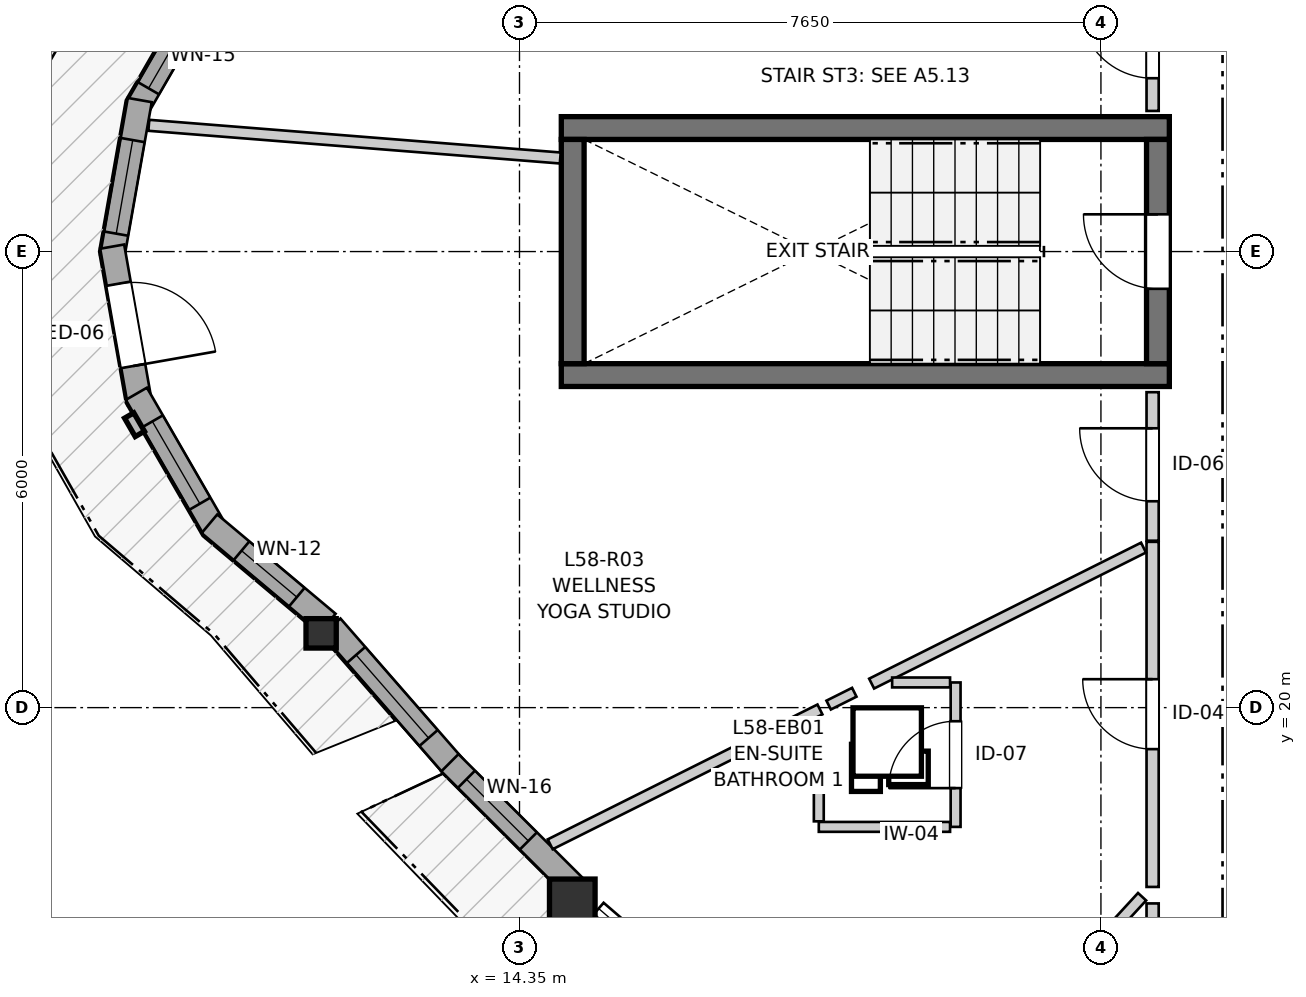
"""IFC4 building model, lengths in metres.
Left out: names, types, materials, properties, quantities, classifications, styles, units other than length and angle.
Written with IfcOpenShell. Run it as: python <this file> out.ifc"""

import sys

from ifc_helpers import new_model, si_unit, direction, frame, frame_2d, origin, origin_2d, place, context, subcontext, project, spatial, rectangle, i_section, extrude, source, transform, mapped, element, fill, save


model = new_model("IFC4")
c1 = context("Model", 3, precision=1e-05, world=origin(), true_north=direction((0.0, 1.0)))
c2 = subcontext(c1, "Body", "Model", "MODEL_VIEW")
j1 = project(units=[si_unit("LENGTHUNIT", "METRE"), si_unit("PLANEANGLEUNIT", "RADIAN")], contexts=[c1])
p1 = place(None, origin())
s1 = spatial("IfcSite", under=j1, at=p1, CompositionType="ELEMENT")
p2 = place(p1, origin())
s2 = spatial("IfcBuilding", under=s1, at=p2, CompositionType="ELEMENT")
p3 = place(p2, frame((0.0, 0.0, 195.6)))
s3 = spatial("IfcBuildingStorey", under=s2, at=p3, CompositionType="ELEMENT", Elevation=195.6)
for number, where, z_axis, x_axis in (
    (1, (14.9, 24.375, 0.0), (0.0, 0.0, 1.0), (1.0, 0.0, 0.0)),
    (2, (22.9, 27.625, 0.0), (0.0, 0.0, 1.0), (-1.0, 0.0, 0.0)),
):
    element("IfcWall", number, at=place(p3, frame(where, z_axis=z_axis, x_axis=x_axis)), inside=s3, PredefinedType="SHEAR", context=c2, shape_type="SweptSolid", body=[
        extrude(rectangle(XDim=8.0, YDim=0.3, at=frame_2d((4.0, 0.0))), origin(), (0.0, 0.0, 1.0), 2.96),
    ])
p4 = place(p3, frame((15.05, 27.475, 0.0), z_axis=(0.0, 0.0, 1.0), x_axis=(0.0, -1.0, 0.0)))
e3 = element("IfcWall", 3, at=p4, inside=s3, PredefinedType="SHEAR", context=c2, shape_type="SweptSolid", body=[
    extrude(rectangle(XDim=2.95, YDim=0.3, at=frame_2d((1.475, 0.0))), origin(), (0.0, 0.0, 1.0), 2.96),
])
p5 = place(p3, frame((22.75, 24.525, 0.0), z_axis=(0.0, 0.0, 1.0), x_axis=(0.0, 1.0, 0.0)))
e4 = element("IfcWall", 4, at=p5, inside=s3, PredefinedType="SHEAR", context=c2, shape_type="SweptSolid", body=[
    extrude(rectangle(XDim=2.95, YDim=0.3, at=frame_2d((1.475, 0.0))), origin(), (0.0, 0.0, 1.0), 2.96),
])
p6 = place(p5, frame((0.985, 0.0, 0.0)))
e5 = element("IfcOpeningElement", 5, at=p6, cuts=e4, PredefinedType="OPENING", context=c2, shape_type="SweptSolid", body=[
    extrude(rectangle(XDim=0.98, YDim=2.15, at=frame_2d((0.49, 1.075))), frame((0.0, 0.16, 0.0), z_axis=(0.0, -1.0, 0.0), x_axis=(1.0, 0.0, 0.0)), (0.0, 0.0, 1.0), 0.32),
])
m1 = source(origin(), c2, "Body", "SweptSolid", [
    extrude(i_section(OverallWidth=0.398, OverallDepth=0.387, WebThickness=0.019, FlangeThickness=0.03, FilletRadius=0.015, at=origin_2d()), origin(), (0.0, 0.0, 1.0), 2.96),
])
p7 = place(p3, frame((11.74, 20.977, 0.0), z_axis=(0.0, 0.0, 1.0), x_axis=(1.0, 0.0, 0.0)))
e6 = element("IfcColumn", 6, at=p7, inside=s3, PredefinedType="PILASTER", context=c2, shape_type="MappedRepresentation", body=[
    mapped(m1, transform((0.0, 0.0, 0.0), x_axis=(1.0, 0.0, 0.0), y_axis=(0.0, 1.0, 0.0), z_axis=(0.0, 0.0, 1.0), scale=1.0)),
])
m2 = source(origin(), c2, "Body", "SweptSolid", [
    extrude(rectangle(XDim=0.6, YDim=0.6, at=origin_2d()), origin(), (0.0, 0.0, 1.0), 2.96),
])
p8 = place(p3, frame((15.044, 17.445, 0.0), z_axis=(0.0, 0.0, 1.0), x_axis=(1.0, 0.0, 0.0)))
e7 = element("IfcColumn", 7, at=p8, inside=s3, PredefinedType="COLUMN", context=c2, shape_type="MappedRepresentation", body=[
    mapped(m2, transform((0.0, 0.0, 0.0), x_axis=(1.0, 0.0, 0.0), y_axis=(0.0, 1.0, 0.0), z_axis=(0.0, 0.0, 1.0), scale=1.0)),
])
p9 = place(p3, frame((10.354, 29.681, 0.0), z_axis=(0.0, 0.0, 1.0), x_axis=(-0.499995423472, -0.866028046028, 0.0)))
e8 = element("IfcWall", 8, at=p9, inside=s3, PredefinedType="SOLIDWALL", context=c2, shape_type="SweptSolid", body=[
    extrude(rectangle(XDim=2.09, YDim=0.32, at=frame_2d((1.045, 0.0))), origin(), (0.0, 0.0, 1.0), 2.58),
])
p10 = place(p9, frame((0.32, 0.0, 0.82)))
e9 = element("IfcOpeningElement", 9, at=p10, cuts=e8, PredefinedType="OPENING", context=c2, shape_type="SweptSolid", body=[
    extrude(rectangle(XDim=1.45, YDim=1.25, at=frame_2d((0.725, 0.625))), frame((0.0, 0.17, 0.0), z_axis=(0.0, -1.0, 0.0), x_axis=(1.0, 0.0, 0.0)), (0.0, 0.0, 1.0), 0.34),
])
p11 = place(p3, frame((9.354, 27.993, 0.0), z_axis=(0.0, 0.0, 1.0), x_axis=(-0.173672066494, -0.984803540469, 0.0)))
e10 = element("IfcWall", 10, at=p11, inside=s3, PredefinedType="SOLIDWALL", context=c2, shape_type="SweptSolid", body=[
    extrude(rectangle(XDim=2.09, YDim=0.32, at=frame_2d((1.045, 0.0))), origin(), (0.0, 0.0, 1.0), 2.58),
])
p12 = place(p11, frame((0.535, 0.0, 0.82)))
e11 = element("IfcOpeningElement", 11, at=p12, cuts=e10, PredefinedType="OPENING", context=c2, shape_type="SweptSolid", body=[
    extrude(rectangle(XDim=1.25, YDim=1.35, at=frame_2d((0.625, 0.675))), frame((0.0, 0.17, 0.0), z_axis=(0.0, -1.0, 0.0), x_axis=(1.0, 0.0, 0.0)), (0.0, 0.0, 1.0), 0.34),
])
p13 = place(p3, frame((8.991, 26.065, 0.0), z_axis=(0.0, 0.0, 1.0), x_axis=(0.173672066494, -0.984803540469, 0.0)))
e12 = element("IfcWall", 12, at=p13, inside=s3, PredefinedType="SOLIDWALL", context=c2, shape_type="SweptSolid", body=[
    extrude(rectangle(XDim=2.09, YDim=0.32, at=frame_2d((1.045, 0.0))), origin(), (0.0, 0.0, 1.0), 2.58),
])
p14 = place(p13, frame((0.495, 0.0, 0.0)))
e13 = element("IfcOpeningElement", 13, at=p14, cuts=e12, PredefinedType="OPENING", context=c2, shape_type="SweptSolid", body=[
    extrude(rectangle(XDim=1.1, YDim=2.1, at=frame_2d((0.55, 1.05))), frame((0.0, 0.17, 0.0), z_axis=(0.0, -1.0, 0.0), x_axis=(1.0, 0.0, 0.0)), (0.0, 0.0, 1.0), 0.34),
])
p15 = place(p3, frame((9.309, 24.129, 0.0), z_axis=(0.0, 0.0, 1.0), x_axis=(0.499995423472, -0.866028046028, 0.0)))
e14 = element("IfcWall", 14, at=p15, inside=s3, PredefinedType="SOLIDWALL", context=c2, shape_type="SweptSolid", body=[
    extrude(rectangle(XDim=2.09, YDim=0.32, at=frame_2d((1.045, 0.0))), origin(), (0.0, 0.0, 1.0), 2.58),
])
p16 = place(p15, frame((0.42, 0.0, 0.82)))
e15 = element("IfcOpeningElement", 15, at=p16, cuts=e14, PredefinedType="OPENING", context=c2, shape_type="SweptSolid", body=[
    extrude(rectangle(XDim=1.25, YDim=1.35, at=frame_2d((0.625, 0.675))), frame((0.0, 0.17, 0.0), z_axis=(0.0, -1.0, 0.0), x_axis=(1.0, 0.0, 0.0)), (0.0, 0.0, 1.0), 0.34),
])
p17 = place(p3, frame((10.271, 22.419, 0.0), z_axis=(0.0, 0.0, 1.0), x_axis=(0.766099948115, -0.642721455608, 0.0)))
e16 = element("IfcWall", 16, at=p17, inside=s3, PredefinedType="SOLIDWALL", context=c2, shape_type="SweptSolid", body=[
    extrude(rectangle(XDim=2.032, YDim=0.32, at=frame_2d((1.016, 0.0))), origin(), (0.0, 0.0, 1.0), 2.58),
])
p18 = place(p17, frame((0.551, 0.0, 0.82)))
e17 = element("IfcOpeningElement", 17, at=p18, cuts=e16, PredefinedType="OPENING", context=c2, shape_type="SweptSolid", body=[
    extrude(rectangle(XDim=0.95, YDim=1.35, at=frame_2d((0.475, 0.675))), frame((0.0, 0.17, 0.0), z_axis=(0.0, -1.0, 0.0), x_axis=(1.0, 0.0, 0.0)), (0.0, 0.0, 1.0), 0.34),
])
p19 = place(p3, frame((11.874, 21.067, 0.0), z_axis=(0.0, 0.0, 1.0), x_axis=(0.657571063417, -0.753392524888, 0.0)))
e18 = element("IfcWall", 18, at=p19, inside=s3, PredefinedType="SOLIDWALL", context=c2, shape_type="SweptSolid", body=[
    extrude(rectangle(XDim=2.464, YDim=0.32, at=frame_2d((1.232, 0.0))), origin(), (0.0, 0.0, 1.0), 2.58),
])
p20 = place(p19, frame((0.497, 0.0, 0.82)))
e19 = element("IfcOpeningElement", 19, at=p20, cuts=e18, PredefinedType="OPENING", context=c2, shape_type="SweptSolid", body=[
    extrude(rectangle(XDim=1.45, YDim=1.25, at=frame_2d((0.725, 0.625))), frame((0.0, 0.17, 0.0), z_axis=(0.0, -1.0, 0.0), x_axis=(1.0, 0.0, 0.0)), (0.0, 0.0, 1.0), 0.34),
])
p21 = place(p3, frame((13.434, 19.275, 0.0), z_axis=(0.0, 0.0, 1.0), x_axis=(0.708408377073, -0.705802784985, 0.0)))
e20 = element("IfcWall", 20, at=p21, inside=s3, PredefinedType="SOLIDWALL", context=c2, shape_type="SweptSolid", body=[
    extrude(rectangle(XDim=2.343, YDim=0.32, at=frame_2d((1.171, 0.0))), origin(), (0.0, 0.0, 1.0), 2.58),
])
p22 = place(p21, frame((0.308, 0.0, 0.82)))
e21 = element("IfcOpeningElement", 21, at=p22, cuts=e20, PredefinedType="OPENING", context=c2, shape_type="SweptSolid", body=[
    extrude(rectangle(XDim=1.15, YDim=1.2, at=frame_2d((0.575, 0.6))), frame((0.0, 0.17, 0.0), z_axis=(0.0, -1.0, 0.0), x_axis=(1.0, 0.0, 0.0)), (0.0, 0.0, 1.0), 0.34),
])
p23 = place(p3, frame((22.68, 17.641, 0.0), z_axis=(0.0, 0.0, 1.0), x_axis=(0.0, 1.0, 0.0)))
e22 = element("IfcWall", 22, at=p23, inside=s3, PredefinedType="PARTITIONING", context=c2, shape_type="SweptSolid", body=[
    extrude(rectangle(XDim=4.54, YDim=0.16, at=frame_2d((2.27, 0.0))), origin(), (0.0, 0.0, 1.0), 2.96),
])
p24 = place(p23, frame((1.813, 0.0, 0.0)))
e23 = element("IfcOpeningElement", 23, at=p24, cuts=e22, PredefinedType="OPENING", context=c2, shape_type="SweptSolid", body=[
    extrude(rectangle(XDim=0.92, YDim=2.1, at=frame_2d((0.46, 1.05))), frame((0.0, 0.09, 0.0), z_axis=(0.0, -1.0, 0.0), x_axis=(1.0, 0.0, 0.0)), (0.0, 0.0, 1.0), 0.18),
])
p25 = place(p3, frame((22.68, 22.196, 0.0), z_axis=(0.0, 0.0, 1.0), x_axis=(0.0, 1.0, 0.0)))
e24 = element("IfcWall", 24, at=p25, inside=s3, PredefinedType="PARTITIONING", context=c2, shape_type="SweptSolid", body=[
    extrude(rectangle(XDim=1.954, YDim=0.16, at=frame_2d((0.977, 0.0))), origin(), (0.0, 0.0, 1.0), 2.96),
])
p26 = place(p25, frame((0.519, 0.0, 0.0)))
e25 = element("IfcOpeningElement", 25, at=p26, cuts=e24, PredefinedType="OPENING", context=c2, shape_type="SweptSolid", body=[
    extrude(rectangle(XDim=0.96, YDim=2.1, at=frame_2d((0.48, 1.05))), frame((0.0, 0.09, 0.0), z_axis=(0.0, -1.0, 0.0), x_axis=(1.0, 0.0, 0.0)), (0.0, 0.0, 1.0), 0.18),
])
p27 = place(p3, frame((20.088, 18.431, 0.0), z_axis=(0.0, 0.0, 1.0), x_axis=(0.0, 1.0, 0.0)))
e26 = element("IfcWall", 26, at=p27, inside=s3, PredefinedType="PARTITIONING", context=c2, shape_type="SweptSolid", body=[
    extrude(rectangle(XDim=1.9, YDim=0.13, at=frame_2d((0.95, 0.0))), origin(), (0.0, 0.0, 1.0), 2.96),
])
p28 = place(p27, frame((0.51, 0.0, 0.0)))
e27 = element("IfcOpeningElement", 27, at=p28, cuts=e26, PredefinedType="OPENING", context=c2, shape_type="SweptSolid", body=[
    extrude(rectangle(XDim=0.88, YDim=2.05, at=frame_2d((0.44, 1.025))), frame((0.0, 0.075, 0.0), z_axis=(0.0, -1.0, 0.0), x_axis=(1.0, 0.0, 0.0)), (0.0, 0.0, 1.0), 0.15),
])
p29 = place(p3, frame((22.68, 27.85, 0.0), z_axis=(0.0, 0.0, 1.0), x_axis=(0.0, 1.0, 0.0)))
e28 = element("IfcWall", 28, at=p29, inside=s3, PredefinedType="PARTITIONING", context=c2, shape_type="SweptSolid", body=[
    extrude(rectangle(XDim=1.731, YDim=0.16, at=frame_2d((0.865, 0.0))), origin(), (0.0, 0.0, 1.0), 2.96),
])
p30 = place(p29, frame((0.43, 0.0, 0.0)))
e29 = element("IfcOpeningElement", 29, at=p30, cuts=e28, PredefinedType="OPENING", context=c2, shape_type="SweptSolid", body=[
    extrude(rectangle(XDim=0.96, YDim=2.1, at=frame_2d((0.48, 1.05))), frame((0.0, 0.09, 0.0), z_axis=(0.0, -1.0, 0.0), x_axis=(1.0, 0.0, 0.0)), (0.0, 0.0, 1.0), 0.18),
])
p31 = place(p3, frame((9.473, 27.661, 0.0), z_axis=(0.0, 0.0, 1.0), x_axis=(0.996864548282, -0.079126938392, 0.0)))
e30 = element("IfcWall", 30, at=p31, inside=s3, PredefinedType="PARTITIONING", context=c2, shape_type="SweptSolid", body=[
    extrude(rectangle(XDim=5.43, YDim=0.145, at=frame_2d((2.715, 0.0))), origin(), (0.0, 0.0, 1.0), 2.96),
])
p32 = place(p3, frame((19.625, 14.343, 0.0), z_axis=(0.0, 0.0, 1.0), x_axis=(0.677104421975, 0.735886949023, 0.0)))
e31 = element("IfcWall", 31, at=p32, inside=s3, PredefinedType="PARTITIONING", context=c2, shape_type="SweptSolid", body=[
    extrude(rectangle(XDim=4.307, YDim=0.145, at=frame_2d((2.153, 0.0))), origin(), (0.0, 0.0, 1.0), 2.96),
])
p33 = place(p3, frame((18.983, 20.316, 0.0), z_axis=(0.0, 0.0, 1.0), x_axis=(0.894366146285, 0.447335664104, 0.0)))
e32 = element("IfcWall", 32, at=p33, inside=s3, PredefinedType="PARTITIONING", context=c2, shape_type="SweptSolid", body=[
    extrude(rectangle(XDim=4.0, YDim=0.145, at=frame_2d((2.0, 0.0))), origin(), (0.0, 0.0, 1.0), 2.96),
])
p34 = place(p3, frame((14.754, 18.202, 0.0), z_axis=(0.0, 0.0, 1.0), x_axis=(0.894464106055, 0.44713975777, 0.0)))
e33 = element("IfcWall", 33, at=p34, inside=s3, PredefinedType="PARTITIONING", context=c2, shape_type="SweptSolid", body=[
    extrude(rectangle(XDim=3.968, YDim=0.145, at=frame_2d((1.984, 0.0))), origin(), (0.0, 0.0, 1.0), 2.96),
])
p35 = place(p3, frame((22.68, 15.796, 0.0), z_axis=(0.0, 0.0, 1.0), x_axis=(0.0, 1.0, 0.0)))
e34 = element("IfcWall", 34, at=p35, inside=s3, PredefinedType="PARTITIONING", context=c2, shape_type="SweptSolid", body=[
    extrude(rectangle(XDim=1.628, YDim=0.16, at=frame_2d((0.814, 0.0))), origin(), (0.0, 0.0, 1.0), 2.96),
])
p36 = place(p3, frame((18.288, 18.431, 0.0), z_axis=(0.0, 0.0, 1.0), x_axis=(1.0, 0.0, 0.0)))
e35 = element("IfcWall", 35, at=p36, inside=s3, PredefinedType="PARTITIONING", context=c2, shape_type="SweptSolid", body=[
    extrude(rectangle(XDim=1.727, YDim=0.13, at=frame_2d((0.863, 0.0))), origin(), (0.0, 0.0, 1.0), 2.96),
])
p37 = place(p3, frame((18.288, 18.504, 0.0), z_axis=(0.0, 0.0, 1.0), x_axis=(0.0, 1.0, 0.0)))
e36 = element("IfcWall", 36, at=p37, inside=s3, PredefinedType="PARTITIONING", context=c2, shape_type="SweptSolid", body=[
    extrude(rectangle(XDim=1.344, YDim=0.13, at=frame_2d((0.672, 0.0))), origin(), (0.0, 0.0, 1.0), 2.96),
])
p38 = place(p3, frame((19.253, 20.331, 0.0), z_axis=(0.0, 0.0, 1.0), x_axis=(1.0, 0.0, 0.0)))
e37 = element("IfcWall", 37, at=p38, inside=s3, PredefinedType="PARTITIONING", context=c2, shape_type="SweptSolid", body=[
    extrude(rectangle(XDim=0.762, YDim=0.13, at=frame_2d((0.381, 0.0))), origin(), (0.0, 0.0, 1.0), 2.96),
])
p39 = place(p3, frame((18.417, 20.033, 0.0), z_axis=(0.0, 0.0, 1.0), x_axis=(0.894427191, 0.4472135955, 0.0)))
e38 = element("IfcWall", 38, at=p39, inside=s3, PredefinedType="PARTITIONING", context=c2, shape_type="SweptSolid", body=[
    extrude(rectangle(XDim=0.377, YDim=0.13, at=frame_2d((0.188, 0.0))), origin(), (0.0, 0.0, 1.0), 2.96),
])
m3 = source(origin(), c2, "Body", "SweptSolid", [
    extrude(rectangle(XDim=1.45, YDim=1.25, at=frame_2d((0.725, 0.625))), frame((0.0, 0.03, 0.0), z_axis=(0.0, -1.0, 0.0), x_axis=(1.0, 0.0, 0.0)), (0.0, 0.0, 1.0), 0.06),
])
p40 = place(p10, origin())
e39 = element("IfcWindow", 39, at=p40, inside=s3, PartitioningType="SINGLE_PANEL", PredefinedType="WINDOW", context=c2, shape_type="MappedRepresentation", body=[
    mapped(m3, transform((0.0, 0.0, 0.0), x_axis=(1.0, 0.0, 0.0), y_axis=(0.0, 1.0, 0.0), z_axis=(0.0, 0.0, 1.0), scale=1.0)),
])
fill(e9, e39)
m4 = source(origin(), c2, "Body", "SweptSolid", [
    extrude(rectangle(XDim=1.25, YDim=1.35, at=frame_2d((0.625, 0.675))), frame((0.0, 0.03, 0.0), z_axis=(0.0, -1.0, 0.0), x_axis=(1.0, 0.0, 0.0)), (0.0, 0.0, 1.0), 0.06),
])
p41 = place(p12, origin())
e40 = element("IfcWindow", 40, at=p41, inside=s3, PartitioningType="SINGLE_PANEL", PredefinedType="WINDOW", context=c2, shape_type="MappedRepresentation", body=[
    mapped(m4, transform((0.0, 0.0, 0.0), x_axis=(1.0, 0.0, 0.0), y_axis=(0.0, 1.0, 0.0), z_axis=(0.0, 0.0, 1.0), scale=1.0)),
])
fill(e11, e40)
m5 = source(origin(), c2, "Body", "SweptSolid", [
    extrude(rectangle(XDim=1.1, YDim=2.1, at=frame_2d((0.55, 1.05))), frame((0.0, 0.025, 0.0), z_axis=(0.0, -1.0, 0.0), x_axis=(1.0, 0.0, 0.0)), (0.0, 0.0, 1.0), 0.05),
])
p42 = place(p14, origin())
e41 = element("IfcDoor", 41, at=p42, inside=s3, OperationType="SINGLE_SWING_RIGHT", PredefinedType="DOOR", context=c2, shape_type="MappedRepresentation", body=[
    mapped(m5, transform((0.0, 0.0, 0.0), x_axis=(1.0, 0.0, 0.0), y_axis=(0.0, 1.0, 0.0), z_axis=(0.0, 0.0, 1.0), scale=1.0)),
])
fill(e13, e41)
p43 = place(p16, origin())
e42 = element("IfcWindow", 42, at=p43, inside=s3, PartitioningType="SINGLE_PANEL", PredefinedType="WINDOW", context=c2, shape_type="MappedRepresentation", body=[
    mapped(m4, transform((0.0, 0.0, 0.0), x_axis=(1.0, 0.0, 0.0), y_axis=(0.0, 1.0, 0.0), z_axis=(0.0, 0.0, 1.0), scale=1.0)),
])
fill(e15, e42)
m6 = source(origin(), c2, "Body", "SweptSolid", [
    extrude(rectangle(XDim=0.95, YDim=1.35, at=frame_2d((0.475, 0.675))), frame((0.0, 0.03, 0.0), z_axis=(0.0, -1.0, 0.0), x_axis=(1.0, 0.0, 0.0)), (0.0, 0.0, 1.0), 0.06),
])
p44 = place(p18, origin())
e43 = element("IfcWindow", 43, at=p44, inside=s3, PartitioningType="SINGLE_PANEL", PredefinedType="WINDOW", context=c2, shape_type="MappedRepresentation", body=[
    mapped(m6, transform((0.0, 0.0, 0.0), x_axis=(1.0, 0.0, 0.0), y_axis=(0.0, 1.0, 0.0), z_axis=(0.0, 0.0, 1.0), scale=1.0)),
])
fill(e17, e43)
p45 = place(p20, origin())
e44 = element("IfcWindow", 44, at=p45, inside=s3, PartitioningType="SINGLE_PANEL", PredefinedType="WINDOW", context=c2, shape_type="MappedRepresentation", body=[
    mapped(m3, transform((0.0, 0.0, 0.0), x_axis=(1.0, 0.0, 0.0), y_axis=(0.0, 1.0, 0.0), z_axis=(0.0, 0.0, 1.0), scale=1.0)),
])
fill(e19, e44)
m7 = source(origin(), c2, "Body", "SweptSolid", [
    extrude(rectangle(XDim=1.15, YDim=1.2, at=frame_2d((0.575, 0.6))), frame((0.0, 0.03, 0.0), z_axis=(0.0, -1.0, 0.0), x_axis=(1.0, 0.0, 0.0)), (0.0, 0.0, 1.0), 0.06),
])
p46 = place(p22, origin())
e45 = element("IfcWindow", 45, at=p46, inside=s3, PartitioningType="SINGLE_PANEL", PredefinedType="WINDOW", context=c2, shape_type="MappedRepresentation", body=[
    mapped(m7, transform((0.0, 0.0, 0.0), x_axis=(1.0, 0.0, 0.0), y_axis=(0.0, 1.0, 0.0), z_axis=(0.0, 0.0, 1.0), scale=1.0)),
])
fill(e21, e45)
m8 = source(origin(), c2, "Body", "SweptSolid", [
    extrude(rectangle(XDim=0.98, YDim=2.15, at=frame_2d((0.49, 1.075))), frame((0.0, 0.025, 0.0), z_axis=(0.0, -1.0, 0.0), x_axis=(1.0, 0.0, 0.0)), (0.0, 0.0, 1.0), 0.05),
])
p47 = place(p6, origin())
e46 = element("IfcDoor", 46, at=p47, inside=s3, OperationType="SINGLE_SWING_RIGHT", PredefinedType="DOOR", context=c2, shape_type="MappedRepresentation", body=[
    mapped(m8, transform((0.0, 0.0, 0.0), x_axis=(1.0, 0.0, 0.0), y_axis=(0.0, 1.0, 0.0), z_axis=(0.0, 0.0, 1.0), scale=1.0)),
])
fill(e5, e46)
m9 = source(origin(), c2, "Body", "SweptSolid", [
    extrude(rectangle(XDim=0.92, YDim=2.1, at=frame_2d((0.46, 1.05))), frame((0.0, 0.025, 0.0), z_axis=(0.0, -1.0, 0.0), x_axis=(1.0, 0.0, 0.0)), (0.0, 0.0, 1.0), 0.05),
])
p48 = place(p24, origin())
e47 = element("IfcDoor", 47, at=p48, inside=s3, OperationType="SINGLE_SWING_RIGHT", PredefinedType="DOOR", context=c2, shape_type="MappedRepresentation", body=[
    mapped(m9, transform((0.0, 0.0, 0.0), x_axis=(1.0, 0.0, 0.0), y_axis=(0.0, 1.0, 0.0), z_axis=(0.0, 0.0, 1.0), scale=1.0)),
])
fill(e23, e47)
m10 = source(origin(), c2, "Body", "SweptSolid", [
    extrude(rectangle(XDim=0.96, YDim=2.1, at=frame_2d((0.48, 1.05))), frame((0.0, 0.025, 0.0), z_axis=(0.0, -1.0, 0.0), x_axis=(1.0, 0.0, 0.0)), (0.0, 0.0, 1.0), 0.05),
])
p49 = place(p26, origin())
e48 = element("IfcDoor", 48, at=p49, inside=s3, OperationType="SINGLE_SWING_RIGHT", PredefinedType="DOOR", context=c2, shape_type="MappedRepresentation", body=[
    mapped(m10, transform((0.0, 0.0, 0.0), x_axis=(1.0, 0.0, 0.0), y_axis=(0.0, 1.0, 0.0), z_axis=(0.0, 0.0, 1.0), scale=1.0)),
])
fill(e25, e48)
m11 = source(origin(), c2, "Body", "SweptSolid", [
    extrude(rectangle(XDim=0.88, YDim=2.05, at=frame_2d((0.44, 1.025))), frame((0.0, 0.025, 0.0), z_axis=(0.0, -1.0, 0.0), x_axis=(1.0, 0.0, 0.0)), (0.0, 0.0, 1.0), 0.05),
])
p50 = place(p28, origin())
e49 = element("IfcDoor", 49, at=p50, inside=s3, OperationType="SINGLE_SWING_LEFT", PredefinedType="DOOR", context=c2, shape_type="MappedRepresentation", body=[
    mapped(m11, transform((0.0, 0.0, 0.0), x_axis=(1.0, 0.0, 0.0), y_axis=(0.0, 1.0, 0.0), z_axis=(0.0, 0.0, 1.0), scale=1.0)),
])
fill(e27, e49)
p51 = place(p30, origin())
e50 = element("IfcDoor", 50, at=p51, inside=s3, OperationType="SINGLE_SWING_RIGHT", PredefinedType="DOOR", context=c2, shape_type="MappedRepresentation", body=[
    mapped(m10, transform((0.0, 0.0, 0.0), x_axis=(1.0, 0.0, 0.0), y_axis=(0.0, 1.0, 0.0), z_axis=(0.0, 0.0, 1.0), scale=1.0)),
])
fill(e29, e50)
save(model, sys.argv[1])
